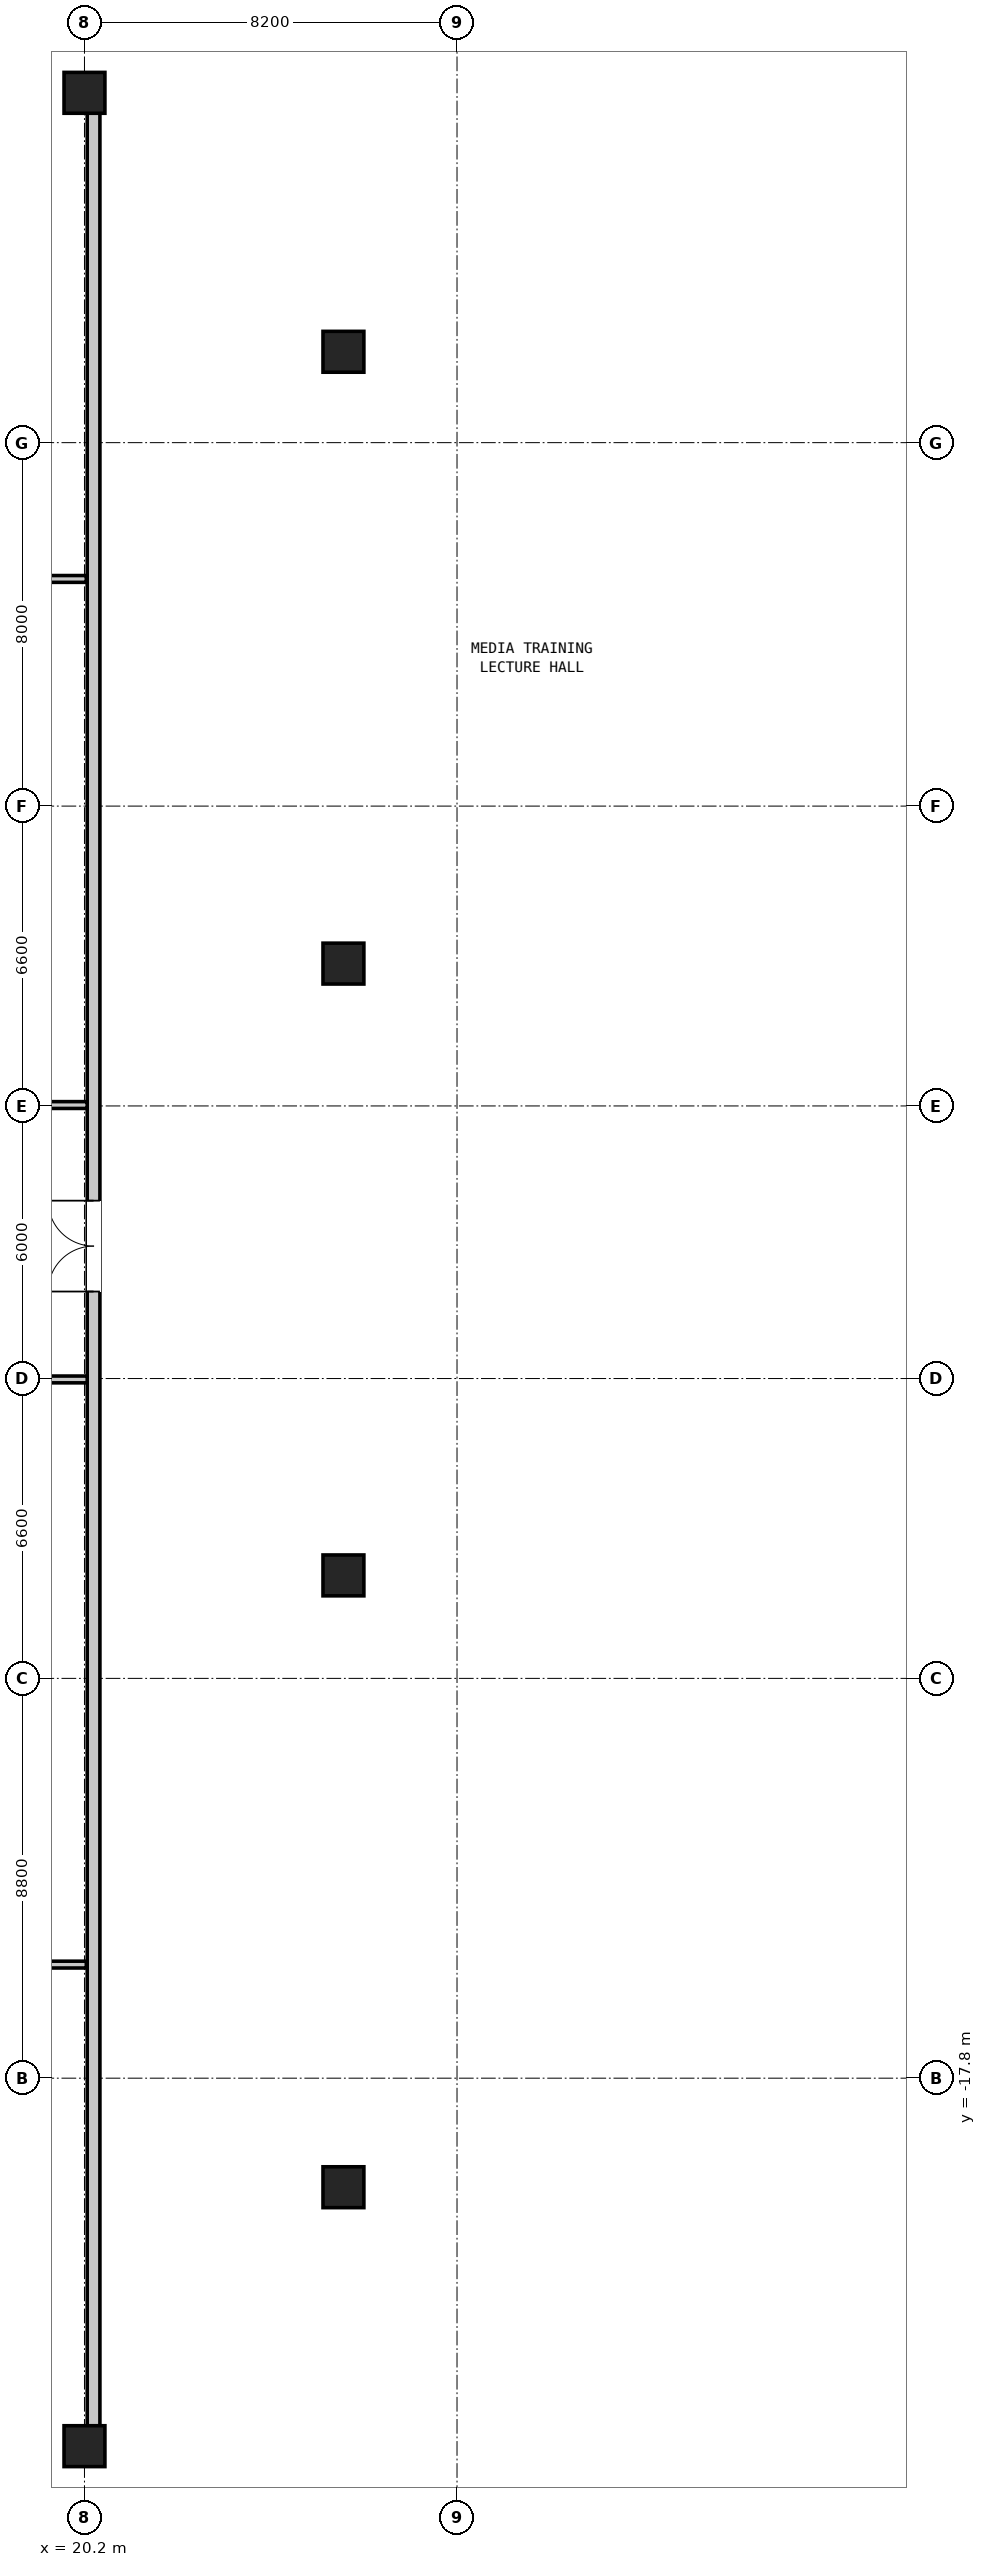
"""IFC4 building model, lengths in metres.
Left out: names, types, materials, properties, quantities, classifications, styles, units other than length and angle.
Written with IfcOpenShell. Run it as: python <this file> out.ifc"""

import sys

from ifc_helpers import new_model, si_unit, direction, frame, frame_2d, origin, origin_2d, place, context, subcontext, project, spatial, rectangle, hollow_rectangle, extrude, element, fill, save


model = new_model("IFC4")
c1 = context("Model", 3, precision=1e-05, world=origin(), true_north=direction((0.0, 1.0)))
c2 = subcontext(c1, "Body", "Model", "MODEL_VIEW")
j1 = project(units=[si_unit("LENGTHUNIT", "METRE"), si_unit("PLANEANGLEUNIT", "RADIAN")], contexts=[c1])
p1 = place(None, origin())
s1 = spatial("IfcSite", under=j1, at=p1, CompositionType="ELEMENT")
p2 = place(p1, origin())
s2 = spatial("IfcBuilding", under=s1, at=p2, CompositionType="ELEMENT")
p3 = place(p2, frame((0.0, 0.0, 21.9)))
s3 = spatial("IfcBuildingStorey", under=s2, at=p3, CompositionType="ELEMENT", Elevation=21.9)
for number, where, z_axis, x_axis in (
    (1, (20.2, -25.9, 0.0), (0.0, 0.0, 1.0), (1.0, 0.0, 0.0)),
    (2, (25.9, -20.2, 0.0), (0.0, 0.0, 1.0), (0.0, 1.0, 0.0)),
    (3, (25.9, -6.733, 0.0), (0.0, 0.0, 1.0), (0.0, 1.0, 0.0)),
    (4, (25.9, 6.733, 0.0), (0.0, 0.0, 1.0), (0.0, 1.0, 0.0)),
    (5, (25.9, 20.2, 0.0), (0.0, 0.0, 1.0), (0.0, 1.0, 0.0)),
    (6, (20.2, 25.9, 0.0), (0.0, 0.0, 1.0), (1.0, 0.0, 0.0)),
):
    element("IfcColumn", number, at=place(p3, frame(where, z_axis=z_axis, x_axis=x_axis)), inside=s3, PredefinedType="COLUMN", context=c2, shape_type="SweptSolid", body=[
        extrude(hollow_rectangle(XDim=0.9, YDim=0.9, WallThickness=0.055, at=origin_2d()), origin(), (0.0, 0.0, 1.0), 4.2),
    ])
p4 = place(p3, frame((20.4, -25.74, 0.0), z_axis=(0.0, 0.0, 1.0), x_axis=(0.0, 1.0, 0.0)))
e7 = element("IfcWall", 7, at=p4, inside=s3, PredefinedType="MOVABLE", context=c2, shape_type="SweptSolid", body=[
    extrude(rectangle(XDim=51.48, YDim=0.28, at=frame_2d((25.74, 0.0))), origin(), (0.0, 0.0, 1.0), 3.98),
])
p5 = place(p4, frame((25.255, 0.0, 0.0)))
e8 = element("IfcOpeningElement", 8, at=p5, cuts=e7, PredefinedType="OPENING", context=c2, shape_type="SweptSolid", body=[
    extrude(rectangle(XDim=2.0, YDim=2.14, at=frame_2d((1.0, 1.07))), frame((0.0, 0.152, 0.0), z_axis=(0.0, -1.0, 0.0), x_axis=(1.0, 0.0, 0.0)), (0.0, 0.0, 1.0), 0.304),
])
p6 = place(p3, frame((0.16, 15.2, 0.0), z_axis=(0.0, 0.0, 1.0), x_axis=(1.0, 0.0, 0.0)))
e9 = element("IfcWall", 9, at=p6, inside=s3, PredefinedType="PARTITIONING", context=c2, shape_type="SweptSolid", body=[
    extrude(rectangle(XDim=20.08, YDim=0.15, at=frame_2d((10.04, 0.0))), origin(), (0.0, 0.0, 1.0), 3.98),
])
p7 = place(p6, frame((4.42, 0.0, 0.0)))
e10 = element("IfcOpeningElement", 10, at=p7, cuts=e9, PredefinedType="OPENING", context=c2, shape_type="SweptSolid", body=[
    extrude(rectangle(XDim=1.2, YDim=2.1, at=frame_2d((0.6, 1.05))), frame((0.0, 0.087, 0.0), z_axis=(0.0, -1.0, 0.0), x_axis=(1.0, 0.0, 0.0)), (0.0, 0.0, 1.0), 0.174),
])
p8 = place(p3, frame((0.16, -15.3, 0.0), z_axis=(0.0, 0.0, 1.0), x_axis=(1.0, 0.0, 0.0)))
e11 = element("IfcWall", 11, at=p8, inside=s3, PredefinedType="PARTITIONING", context=c2, shape_type="SweptSolid", body=[
    extrude(rectangle(XDim=20.08, YDim=0.15, at=frame_2d((10.04, 0.0))), origin(), (0.0, 0.0, 1.0), 3.98),
])
p9 = place(p8, frame((4.42, 0.0, 0.0)))
e12 = element("IfcOpeningElement", 12, at=p9, cuts=e11, PredefinedType="OPENING", context=c2, shape_type="SweptSolid", body=[
    extrude(rectangle(XDim=1.2, YDim=2.1, at=frame_2d((0.6, 1.05))), frame((0.0, 0.087, 0.0), z_axis=(0.0, -1.0, 0.0), x_axis=(1.0, 0.0, 0.0)), (0.0, 0.0, 1.0), 0.174),
])
for number, where, z_axis, x_axis in (
    (13, (12.46, -2.42, 0.0), (0.0, 0.0, 1.0), (1.0, 0.0, 0.0)),
    (14, (12.46, 3.62, 0.0), (0.0, 0.0, 1.0), (1.0, 0.0, 0.0)),
):
    element("IfcWall", number, at=place(p3, frame(where, z_axis=z_axis, x_axis=x_axis)), inside=s3, PredefinedType="PARTITIONING", context=c2, shape_type="SweptSolid", body=[
        extrude(rectangle(XDim=7.8, YDim=0.15, at=frame_2d((3.9, 0.0))), origin(), (0.0, 0.0, 1.0), 2.949),
    ])
p10 = place(p5, origin())
e15 = element("IfcDoor", 15, at=p10, inside=s3, OperationType="DOUBLE_DOOR_SINGLE_SWING", PredefinedType="DOOR", context=c2, shape_type="SweptSolid", body=[
    extrude(rectangle(XDim=2.0, YDim=2.14, at=frame_2d((1.0, 1.07))), frame((0.0, 0.025, 0.0), z_axis=(0.0, -1.0, 0.0), x_axis=(1.0, 0.0, 0.0)), (0.0, 0.0, 1.0), 0.05),
])
fill(e8, e15)
save(model, sys.argv[1])
